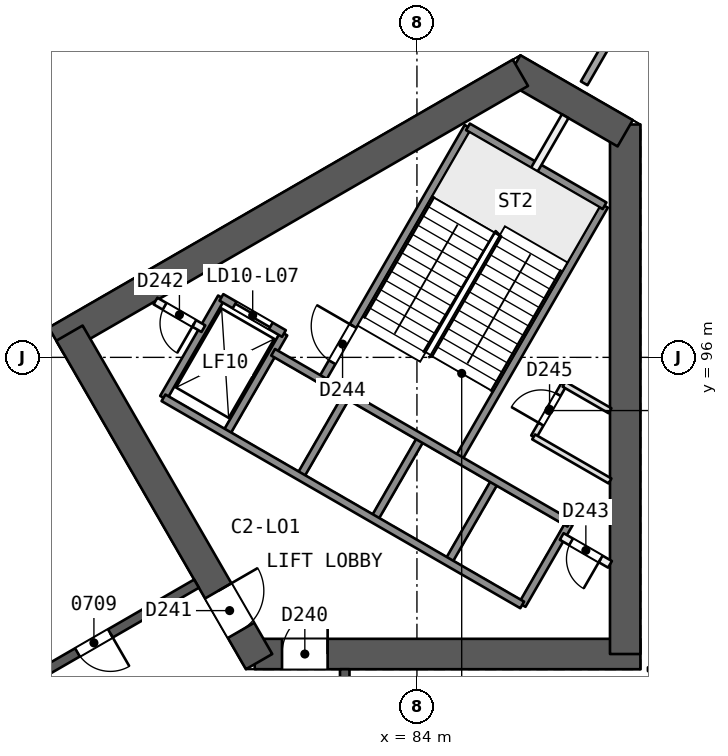
"""IFC4 building model, lengths in metres.
Left out: names, types, materials, properties, quantities, classifications, styles, units other than length and angle.
Written with IfcOpenShell. Run it as: python <this file> out.ifc"""

import sys

from ifc_helpers import new_model, si_unit, direction, frame, frame_2d, origin, place, context, subcontext, project, spatial, rectangle, extrude, element, fill, save


model = new_model("IFC4")
c1 = context("Model", 3, precision=1e-05, world=origin(), true_north=direction((0.0, 1.0)))
c2 = subcontext(c1, "Body", "Model", "MODEL_VIEW")
j1 = project(units=[si_unit("LENGTHUNIT", "METRE"), si_unit("PLANEANGLEUNIT", "RADIAN")], contexts=[c1])
p1 = place(None, origin())
s1 = spatial("IfcSite", under=j1, at=p1, CompositionType="ELEMENT")
p2 = place(p1, origin())
s2 = spatial("IfcBuilding", under=s1, at=p2, CompositionType="ELEMENT")
p3 = place(p2, frame((0.0, 0.0, 37.4)))
s3 = spatial("IfcBuildingStorey", under=s2, at=p3, CompositionType="ELEMENT", Elevation=37.4)
p4 = place(p3, frame((79.731, 88.194, 0.0), z_axis=(0.0, 0.0, 1.0), x_axis=(1.0, 0.0, 0.0)))
e1 = element("IfcWall", 1, at=p4, inside=s3, PredefinedType="SHEAR", context=c2, shape_type="SweptSolid", body=[
    extrude(rectangle(XDim=10.149, YDim=0.8, at=frame_2d((5.074, 0.0))), origin(), (0.0, 0.0, 1.0), 3.7),
])
p5 = place(p4, frame((0.719, 0.0, 0.0)))
e2 = element("IfcOpeningElement", 2, at=p5, cuts=e1, PredefinedType="OPENING", context=c2, shape_type="SweptSolid", body=[
    extrude(rectangle(XDim=1.2, YDim=2.1, at=frame_2d((0.6, 1.05))), frame((0.0, 0.411, 0.0), z_axis=(0.0, -1.0, 0.0), x_axis=(1.0, 0.0, 0.0)), (0.0, 0.0, 1.0), 0.821),
])
p6 = place(p3, frame((89.48, 88.194, 0.0), z_axis=(0.0, 0.0, 1.0), x_axis=(0.0, 1.0, 0.0)))
e3 = element("IfcWall", 3, at=p6, inside=s3, PredefinedType="SHEAR", context=c2, shape_type="SweptSolid", body=[
    extrude(rectangle(XDim=13.933, YDim=0.8, at=frame_2d((6.967, 0.0))), origin(), (0.0, 0.0, 1.0), 3.7),
])
p7 = place(p3, frame((89.48, 101.897, 0.0), z_axis=(0.0, 0.0, 1.0), x_axis=(-0.866034355626, 0.499984494636, 0.0)))
e4 = element("IfcWall", 4, at=p7, inside=s3, PredefinedType="SHEAR", context=c2, shape_type="SweptSolid", body=[
    extrude(rectangle(XDim=3.414, YDim=0.8, at=frame_2d((1.707, 0.0))), origin(), (0.0, 0.0, 1.0), 3.7),
])
p8 = place(p3, frame((86.723, 103.488, 0.0), z_axis=(0.0, 0.0, 1.0), x_axis=(-0.866032504327, -0.499987701298, 0.0)))
e5 = element("IfcWall", 5, at=p8, inside=s3, PredefinedType="SHEAR", context=c2, shape_type="SweptSolid", body=[
    extrude(rectangle(XDim=14.102, YDim=0.8, at=frame_2d((7.051, 0.0))), origin(), (0.0, 0.0, 1.0), 3.7),
])
p9 = place(p3, frame((74.856, 96.637, 0.0), z_axis=(0.0, 0.0, 1.0), x_axis=(0.499993500917, -0.866029155999, 0.0)))
e6 = element("IfcWall", 6, at=p9, inside=s3, PredefinedType="SHEAR", context=c2, shape_type="SweptSolid", body=[
    extrude(rectangle(XDim=9.98, YDim=0.8, at=frame_2d((4.99, 0.0))), origin(), (0.0, 0.0, 1.0), 3.7),
])
p10 = place(p9, frame((7.83, 0.0, 0.0)))
e7 = element("IfcOpeningElement", 7, at=p10, cuts=e6, PredefinedType="OPENING", context=c2, shape_type="SweptSolid", body=[
    extrude(rectangle(XDim=1.2, YDim=2.1, at=frame_2d((0.6, 1.05))), frame((0.0, 0.411, 0.0), z_axis=(0.0, -1.0, 0.0), x_axis=(1.0, 0.0, 0.0)), (0.0, 0.0, 1.0), 0.821),
])
p11 = place(p3, frame((82.1, 72.206, 0.0), z_axis=(0.0, 0.0, 1.0), x_axis=(0.0, 1.0, 0.0)))
e8 = element("IfcWall", 8, at=p11, inside=s3, PredefinedType="SHEAR", context=c2, shape_type="SweptSolid", body=[
    extrude(rectangle(XDim=15.588, YDim=0.25, at=frame_2d((7.794, 0.0))), origin(), (0.0, 0.0, 1.0), 3.2),
])
p12 = place(p11, frame((2.462, 0.0, 0.0)))
e9 = element("IfcOpeningElement", 9, at=p12, cuts=e8, PredefinedType="OPENING", context=c2, shape_type="SweptSolid", body=[
    extrude(rectangle(XDim=1.0, YDim=2.1, at=frame_2d((0.5, 1.05))), frame((0.0, 0.135, 0.0), z_axis=(0.0, -1.0, 0.0), x_axis=(1.0, 0.0, 0.0)), (0.0, 0.0, 1.0), 0.271),
])
p13 = place(p11, frame((8.315, 0.0, 0.0)))
e10 = element("IfcOpeningElement", 10, at=p13, cuts=e8, PredefinedType="OPENING", context=c2, shape_type="SweptSolid", body=[
    extrude(rectangle(XDim=1.1, YDim=2.1, at=frame_2d((0.55, 1.05))), frame((0.0, 0.135, 0.0), z_axis=(0.0, -1.0, 0.0), x_axis=(1.0, 0.0, 0.0)), (0.0, 0.0, 1.0), 0.271),
])
p14 = place(p11, frame((12.127, 0.0, 0.0)))
e11 = element("IfcOpeningElement", 11, at=p14, cuts=e8, PredefinedType="OPENING", context=c2, shape_type="SweptSolid", body=[
    extrude(rectangle(XDim=1.0, YDim=2.1, at=frame_2d((0.5, 1.05))), frame((0.0, 0.135, 0.0), z_axis=(0.0, -1.0, 0.0), x_axis=(1.0, 0.0, 0.0)), (0.0, 0.0, 1.0), 0.271),
])
p15 = place(p3, frame((78.2, 90.046, 0.0), z_axis=(0.0, 0.0, 1.0), x_axis=(-0.866026492143, -0.499998114903, 0.0)))
e12 = element("IfcWall", 12, at=p15, inside=s3, PredefinedType="SHEAR", context=c2, shape_type="SweptSolid", body=[
    extrude(rectangle(XDim=15.588, YDim=0.25, at=frame_2d((7.794, 0.0))), origin(), (0.0, 0.0, 1.0), 3.2),
])
p16 = place(p15, frame((2.618, 0.0, 0.0)))
e13 = element("IfcOpeningElement", 13, at=p16, cuts=e12, PredefinedType="OPENING", context=c2, shape_type="SweptSolid", body=[
    extrude(rectangle(XDim=1.0, YDim=2.1, at=frame_2d((0.5, 1.05))), frame((0.0, 0.135, 0.0), z_axis=(0.0, -1.0, 0.0), x_axis=(1.0, 0.0, 0.0)), (0.0, 0.0, 1.0), 0.271),
])
p17 = place(p15, frame((9.218, 0.0, 0.0)))
e14 = element("IfcOpeningElement", 14, at=p17, cuts=e12, PredefinedType="OPENING", context=c2, shape_type="SweptSolid", body=[
    extrude(rectangle(XDim=1.0, YDim=2.1, at=frame_2d((0.5, 1.05))), frame((0.0, 0.135, 0.0), z_axis=(0.0, -1.0, 0.0), x_axis=(1.0, 0.0, 0.0)), (0.0, 0.0, 1.0), 0.271),
])
p18 = place(p15, frame((12.594, 0.0, 0.0)))
e15 = element("IfcOpeningElement", 15, at=p18, cuts=e12, PredefinedType="OPENING", context=c2, shape_type="SweptSolid", body=[
    extrude(rectangle(XDim=1.0, YDim=2.1, at=frame_2d((0.5, 1.05))), frame((0.0, 0.135, 0.0), z_axis=(0.0, -1.0, 0.0), x_axis=(1.0, 0.0, 0.0)), (0.0, 0.0, 1.0), 0.271),
])
p19 = place(p3, frame((96.202, 87.794, 0.0), z_axis=(0.0, 0.0, 1.0), x_axis=(-1.0, 0.0, 0.0)))
e16 = element("IfcWall", 16, at=p19, inside=s3, PredefinedType="PARTITIONING", context=c2, shape_type="SweptSolid", body=[
    extrude(rectangle(XDim=6.123, YDim=0.1, at=frame_2d((3.061, 0.0))), origin(), (0.0, 0.0, 1.0), 3.2),
])
p20 = place(p19, frame((2.611, 0.0, 0.0)))
e17 = element("IfcOpeningElement", 17, at=p20, cuts=e16, PredefinedType="OPENING", context=c2, shape_type="SweptSolid", body=[
    extrude(rectangle(XDim=0.9, YDim=2.1, at=frame_2d((0.45, 1.05))), frame((0.0, 0.061, 0.0), z_axis=(0.0, -1.0, 0.0), x_axis=(1.0, 0.0, 0.0)), (0.0, 0.0, 1.0), 0.121),
])
p21 = place(p3, frame((93.556, 112.139, 0.0), z_axis=(0.0, 0.0, 1.0), x_axis=(-0.499997833203, -0.866026654782, 0.0)))
e18 = element("IfcWall", 18, at=p21, inside=s3, PredefinedType="PARTITIONING", context=c2, shape_type="SweptSolid", body=[
    extrude(rectangle(XDim=10.309, YDim=0.2, at=frame_2d((5.155, 0.0))), origin(), (0.0, 0.0, 1.0), 3.2),
])
p22 = place(p3, frame((37.74, 83.141, 0.0), z_axis=(0.0, 0.0, 1.0), x_axis=(0.866026524777, 0.499998058379, 0.0)))
e19 = element("IfcWall", 19, at=p22, inside=s3, PredefinedType="SOLIDWALL", context=c2, shape_type="SweptSolid", body=[
    extrude(rectangle(XDim=61.395, YDim=0.3, at=frame_2d((30.698, 0.0))), origin(), (0.0, 0.0, 1.0), 3.2),
])
p23 = place(p22, frame((34.174, 0.0, 0.0)))
e20 = element("IfcOpeningElement", 20, at=p23, cuts=e19, PredefinedType="OPENING", context=c2, shape_type="SweptSolid", body=[
    extrude(rectangle(XDim=2.4, YDim=2.4, at=frame_2d((1.2, 1.2))), frame((0.0, 0.161, 0.0), z_axis=(0.0, -1.0, 0.0), x_axis=(1.0, 0.0, 0.0)), (0.0, 0.0, 1.0), 0.321),
])
p24 = place(p22, frame((47.603, 0.0, 0.0)))
e21 = element("IfcOpeningElement", 21, at=p24, cuts=e19, PredefinedType="OPENING", context=c2, shape_type="SweptSolid", body=[
    extrude(rectangle(XDim=2.4, YDim=2.4, at=frame_2d((1.2, 1.2))), frame((0.0, 0.161, 0.0), z_axis=(0.0, -1.0, 0.0), x_axis=(1.0, 0.0, 0.0)), (0.0, 0.0, 1.0), 0.321),
])
p25 = place(p22, frame((24.198, 0.0, 0.0)))
e22 = element("IfcOpeningElement", 22, at=p25, cuts=e19, PredefinedType="OPENING", context=c2, shape_type="SweptSolid", body=[
    extrude(rectangle(XDim=2.4, YDim=2.4, at=frame_2d((1.2, 1.2))), frame((0.0, 0.161, 0.0), z_axis=(0.0, -1.0, 0.0), x_axis=(1.0, 0.0, 0.0)), (0.0, 0.0, 1.0), 0.321),
])
p26 = place(p22, frame((11.394, 0.0, 0.0)))
e23 = element("IfcOpeningElement", 23, at=p26, cuts=e19, PredefinedType="OPENING", context=c2, shape_type="SweptSolid", body=[
    extrude(rectangle(XDim=2.4, YDim=2.4, at=frame_2d((1.2, 1.2))), frame((0.0, 0.161, 0.0), z_axis=(0.0, -1.0, 0.0), x_axis=(1.0, 0.0, 0.0)), (0.0, 0.0, 1.0), 0.321),
])
p27 = place(p22, frame((28.874, 0.0, 0.0)))
e24 = element("IfcOpeningElement", 24, at=p27, cuts=e19, PredefinedType="OPENING", context=c2, shape_type="SweptSolid", body=[
    extrude(rectangle(XDim=2.4, YDim=2.4, at=frame_2d((1.2, 1.2))), frame((0.0, 0.161, 0.0), z_axis=(0.0, -1.0, 0.0), x_axis=(1.0, 0.0, 0.0)), (0.0, 0.0, 1.0), 0.321),
])
p28 = place(p3, frame((86.77, 89.486, 0.0), z_axis=(0.0, 0.0, 1.0), x_axis=(0.499961042966, 0.86604789447, 0.0)))
e25 = element("IfcWall", 25, at=p28, inside=s3, PredefinedType="SOLIDWALL", context=c2, shape_type="SweptSolid", body=[
    extrude(rectangle(XDim=2.48, YDim=0.2, at=frame_2d((1.24, 0.0))), origin(), (0.0, 0.0, 1.0), 3.2),
])
p29 = place(p3, frame((87.071, 93.908, 0.0), z_axis=(0.0, 0.0, 1.0), x_axis=(0.499995408039, 0.866028054938, 0.0)))
e26 = element("IfcWall", 26, at=p29, inside=s3, PredefinedType="PARTITIONING", context=c2, shape_type="SweptSolid", body=[
    extrude(rectangle(XDim=1.6, YDim=0.15, at=frame_2d((0.8, 0.0))), origin(), (0.0, 0.0, 1.0), 3.2),
])
p30 = place(p29, frame((0.387, 0.0, 0.0)))
e27 = element("IfcOpeningElement", 27, at=p30, cuts=e26, PredefinedType="OPENING", context=c2, shape_type="SweptSolid", body=[
    extrude(rectangle(XDim=0.9, YDim=2.1, at=frame_2d((0.45, 1.05))), frame((0.0, 0.085, 0.0), z_axis=(0.0, -1.0, 0.0), x_axis=(1.0, 0.0, 0.0)), (0.0, 0.0, 1.0), 0.171),
])
p31 = place(p3, frame((84.821, 90.611, 0.0), z_axis=(0.0, 0.0, 1.0), x_axis=(0.499961042966, 0.86604789447, 0.0)))
e28 = element("IfcWall", 28, at=p31, inside=s3, PredefinedType="SOLIDWALL", context=c2, shape_type="SweptSolid", body=[
    extrude(rectangle(XDim=2.48, YDim=0.2, at=frame_2d((1.24, 0.0))), origin(), (0.0, 0.0, 1.0), 3.2),
])
p32 = place(p3, frame((85.087, 93.321, 0.0), z_axis=(0.0, 0.0, 1.0), x_axis=(0.500019787375, 0.866013979237, 0.0)))
e29 = element("IfcWall", 29, at=p32, inside=s3, PredefinedType="SOLIDWALL", context=c2, shape_type="SweptSolid", body=[
    extrude(rectangle(XDim=7.7, YDim=0.2, at=frame_2d((3.85, 0.0))), origin(), (0.0, 0.0, 1.0), 3.2),
])
p33 = place(p3, frame((82.873, 91.736, 0.0), z_axis=(0.0, 0.0, 1.0), x_axis=(0.499961042966, 0.86604789447, 0.0)))
e30 = element("IfcWall", 30, at=p33, inside=s3, PredefinedType="SOLIDWALL", context=c2, shape_type="SweptSolid", body=[
    extrude(rectangle(XDim=2.48, YDim=0.2, at=frame_2d((1.24, 0.0))), origin(), (0.0, 0.0, 1.0), 3.2),
])
p34 = place(p3, frame((87.09, 100.94, 0.0), z_axis=(0.0, 0.0, 1.0), x_axis=(0.499956811548, 0.866050337213, 0.0)))
e31 = element("IfcWall", 31, at=p34, inside=s3, PredefinedType="PARTITIONING", context=c2, shape_type="SweptSolid", body=[
    extrude(rectangle(XDim=1.623, YDim=0.2, at=frame_2d((0.812, 0.0))), origin(), (0.0, 0.0, 1.0), 3.2),
])
p35 = place(p3, frame((80.924, 92.861, 0.0), z_axis=(0.0, 0.0, 1.0), x_axis=(0.499961042966, 0.86604789447, 0.0)))
e32 = element("IfcWall", 32, at=p35, inside=s3, PredefinedType="SOLIDWALL", context=c2, shape_type="SweptSolid", body=[
    extrude(rectangle(XDim=2.48, YDim=0.2, at=frame_2d((1.24, 0.0))), origin(), (0.0, 0.0, 1.0), 3.2),
])
p36 = place(p3, frame((81.493, 95.396, 0.0), z_axis=(0.0, 0.0, 1.0), x_axis=(0.500006057782, 0.866021906294, 0.0)))
e33 = element("IfcWall", 33, at=p36, inside=s3, PredefinedType="SOLIDWALL", context=c2, shape_type="SweptSolid", body=[
    extrude(rectangle(XDim=7.7, YDim=0.2, at=frame_2d((3.85, 0.0))), origin(), (0.0, 0.0, 1.0), 3.2),
])
p37 = place(p36, frame((0.55, 0.0, 0.0)))
e34 = element("IfcOpeningElement", 34, at=p37, cuts=e33, PredefinedType="OPENING", context=c2, shape_type="SweptSolid", body=[
    extrude(rectangle(XDim=1.1, YDim=2.1, at=frame_2d((0.55, 1.05))), frame((0.0, 0.11, 0.0), z_axis=(0.0, -1.0, 0.0), x_axis=(1.0, 0.0, 0.0)), (0.0, 0.0, 1.0), 0.221),
])
for number, where, z_axis, x_axis in (
    (35, (78.976, 93.986, 0.0), (0.0, 0.0, 1.0), (0.5, 0.866, 0.0)),
    (36, (77.33, 94.936, 0.0), (0.0, 0.0, 1.0), (0.5, 0.866, 0.0)),
):
    element("IfcWall", number, at=place(p3, frame(where, z_axis=z_axis, x_axis=x_axis)), inside=s3, PredefinedType="SOLIDWALL", context=c2, shape_type="SweptSolid", body=[
        extrude(rectangle(XDim=3.05, YDim=0.2, at=frame_2d((1.525, 0.0))), origin(), (0.0, 0.0, 1.0), 3.2),
    ])
p38 = place(p3, frame((86.77, 89.486, 0.0), z_axis=(0.0, 0.0, 1.0), x_axis=(-0.86601811187, 0.500012629753, 0.0)))
e37 = element("IfcWall", 37, at=p38, inside=s3, PredefinedType="SOLIDWALL", context=c2, shape_type="SweptSolid", body=[
    extrude(rectangle(XDim=10.9, YDim=0.2, at=frame_2d((5.45, 0.0))), origin(), (0.0, 0.0, 1.0), 3.2),
])
p39 = place(p3, frame((89.08, 90.554, 0.0), z_axis=(0.0, 0.0, 1.0), x_axis=(-0.866022048785, 0.500005810984, 0.0)))
e38 = element("IfcWall", 38, at=p39, inside=s3, PredefinedType="PARTITIONING", context=c2, shape_type="SweptSolid", body=[
    extrude(rectangle(XDim=1.467, YDim=0.2, at=frame_2d((0.733, 0.0))), origin(), (0.0, 0.0, 1.0), 3.2),
])
p40 = place(p39, frame((0.283, 0.0, 0.0)))
e39 = element("IfcOpeningElement", 39, at=p40, cuts=e38, PredefinedType="OPENING", context=c2, shape_type="SweptSolid", body=[
    extrude(rectangle(XDim=0.9, YDim=2.1, at=frame_2d((0.45, 1.05))), frame((0.0, 0.11, 0.0), z_axis=(0.0, -1.0, 0.0), x_axis=(1.0, 0.0, 0.0)), (0.0, 0.0, 1.0), 0.221),
])
p41 = place(p3, frame((78.38, 96.755, 0.0), z_axis=(0.0, 0.0, 1.0), x_axis=(-0.866003949776, 0.500037157592, 0.0)))
e40 = element("IfcWall", 40, at=p41, inside=s3, PredefinedType="PARTITIONING", context=c2, shape_type="SweptSolid", body=[
    extrude(rectangle(XDim=1.455, YDim=0.2, at=frame_2d((0.728, 0.0))), origin(), (0.0, 0.0, 1.0), 3.2),
])
p42 = place(p41, frame((0.278, 0.0, 0.0)))
e41 = element("IfcOpeningElement", 41, at=p42, cuts=e40, PredefinedType="OPENING", context=c2, shape_type="SweptSolid", body=[
    extrude(rectangle(XDim=0.9, YDim=2.1, at=frame_2d((0.45, 1.05))), frame((0.0, 0.11, 0.0), z_axis=(0.0, -1.0, 0.0), x_axis=(1.0, 0.0, 0.0)), (0.0, 0.0, 1.0), 0.221),
])
p43 = place(p3, frame((88.01, 91.634, 0.0), z_axis=(0.0, 0.0, 1.0), x_axis=(-0.866024315419, 0.5000018851, 0.0)))
e42 = element("IfcWall", 42, at=p43, inside=s3, PredefinedType="SOLIDWALL", context=c2, shape_type="SweptSolid", body=[
    extrude(rectangle(XDim=9.0, YDim=0.2, at=frame_2d((4.5, 0.0))), origin(), (0.0, 0.0, 1.0), 3.2),
])
p44 = place(p3, frame((80.5, 96.627, 0.0), z_axis=(0.0, 0.0, 1.0), x_axis=(-0.86601224135, 0.500022797313, 0.0)))
e43 = element("IfcWall", 43, at=p44, inside=s3, PredefinedType="SOLIDWALL", context=c2, shape_type="SweptSolid", body=[
    extrude(rectangle(XDim=1.9, YDim=0.2, at=frame_2d((0.95, 0.0))), origin(), (0.0, 0.0, 1.0), 3.2),
])
p45 = place(p44, frame((0.4, 0.0, 0.0)))
e44 = element("IfcOpeningElement", 44, at=p45, cuts=e43, PredefinedType="OPENING", context=c2, shape_type="SweptSolid", body=[
    extrude(rectangle(XDim=1.1, YDim=2.1, at=frame_2d((0.55, 1.05))), frame((0.0, 0.11, 0.0), z_axis=(0.0, -1.0, 0.0), x_axis=(1.0, 0.0, 0.0)), (0.0, 0.0, 1.0), 0.221),
])
p46 = place(p3, frame((89.08, 92.748, 0.0), z_axis=(0.0, 0.0, 1.0), x_axis=(-0.866026103983, 0.499998787219, 0.0)))
e45 = element("IfcWall", 45, at=p46, inside=s3, PredefinedType="PARTITIONING", context=c2, shape_type="SweptSolid", body=[
    extrude(rectangle(XDim=2.32, YDim=0.15, at=frame_2d((1.16, 0.0))), origin(), (0.0, 0.0, 1.0), 3.2),
])
p47 = place(p3, frame((89.08, 94.595, 0.0), z_axis=(0.0, 0.0, 1.0), x_axis=(-0.866028321769, 0.499994945868, 0.0)))
e46 = element("IfcWall", 46, at=p47, inside=s3, PredefinedType="PARTITIONING", context=c2, shape_type="SweptSolid", body=[
    extrude(rectangle(XDim=1.396, YDim=0.15, at=frame_2d((0.698, 0.0))), origin(), (0.0, 0.0, 1.0), 3.2),
])
p48 = place(p3, frame((88.937, 99.99, 0.0), z_axis=(0.0, 0.0, 1.0), x_axis=(-0.866004344652, 0.500036473714, 0.0)))
e47 = element("IfcWall", 47, at=p48, inside=s3, PredefinedType="SOLIDWALL", context=c2, shape_type="SweptSolid", body=[
    extrude(rectangle(XDim=4.15, YDim=0.2, at=frame_2d((2.075, 0.0))), origin(), (0.0, 0.0, 1.0), 3.2),
])
p49 = place(p16, origin())
e48 = element("IfcDoor", 48, at=p49, inside=s3, OperationType="SINGLE_SWING_LEFT", PredefinedType="NOTDEFINED", context=c2, shape_type="SweptSolid", body=[
    extrude(rectangle(XDim=1.0, YDim=2.1, at=frame_2d((0.5, 1.05))), frame((0.0, 0.025, 0.0), z_axis=(0.0, -1.0, 0.0), x_axis=(1.0, 0.0, 0.0)), (0.0, 0.0, 1.0), 0.05),
])
fill(e13, e48)
p50 = place(p5, origin())
e49 = element("IfcDoor", 49, at=p50, inside=s3, OperationType="SINGLE_SWING_RIGHT", PredefinedType="NOTDEFINED", context=c2, shape_type="SweptSolid", body=[
    extrude(rectangle(XDim=1.2, YDim=2.1, at=frame_2d((0.6, 1.05))), frame((0.0, 0.025, 0.0), z_axis=(0.0, -1.0, 0.0), x_axis=(1.0, 0.0, 0.0)), (0.0, 0.0, 1.0), 0.05),
])
fill(e2, e49)
p51 = place(p10, origin())
e50 = element("IfcDoor", 50, at=p51, inside=s3, OperationType="SINGLE_SWING_LEFT", PredefinedType="NOTDEFINED", context=c2, shape_type="SweptSolid", body=[
    extrude(rectangle(XDim=1.2, YDim=2.1, at=frame_2d((0.6, 1.05))), frame((0.0, 0.025, 0.0), z_axis=(0.0, -1.0, 0.0), x_axis=(1.0, 0.0, 0.0)), (0.0, 0.0, 1.0), 0.05),
])
fill(e7, e50)
p52 = place(p45, origin())
e51 = element("IfcDoor", 51, at=p52, inside=s3, OperationType="SLIDING_TO_RIGHT", PredefinedType="NOTDEFINED", context=c2, shape_type="SweptSolid", body=[
    extrude(rectangle(XDim=1.1, YDim=2.1, at=frame_2d((0.55, 1.05))), frame((0.0, 0.025, 0.0), z_axis=(0.0, -1.0, 0.0), x_axis=(1.0, 0.0, 0.0)), (0.0, 0.0, 1.0), 0.05),
])
fill(e44, e51)
p53 = place(p42, origin())
e52 = element("IfcDoor", 52, at=p53, inside=s3, OperationType="SINGLE_SWING_LEFT", PredefinedType="NOTDEFINED", context=c2, shape_type="SweptSolid", body=[
    extrude(rectangle(XDim=0.9, YDim=2.1, at=frame_2d((0.45, 1.05))), frame((0.0, 0.025, 0.0), z_axis=(0.0, -1.0, 0.0), x_axis=(1.0, 0.0, 0.0)), (0.0, 0.0, 1.0), 0.05),
])
fill(e41, e52)
p54 = place(p40, origin())
e53 = element("IfcDoor", 53, at=p54, inside=s3, OperationType="SINGLE_SWING_LEFT", PredefinedType="NOTDEFINED", context=c2, shape_type="SweptSolid", body=[
    extrude(rectangle(XDim=0.9, YDim=2.1, at=frame_2d((0.45, 1.05))), frame((0.0, 0.025, 0.0), z_axis=(0.0, -1.0, 0.0), x_axis=(1.0, 0.0, 0.0)), (0.0, 0.0, 1.0), 0.05),
])
fill(e39, e53)
p55 = place(p37, origin())
e54 = element("IfcDoor", 54, at=p55, inside=s3, OperationType="SINGLE_SWING_RIGHT", PredefinedType="NOTDEFINED", context=c2, shape_type="SweptSolid", body=[
    extrude(rectangle(XDim=1.1, YDim=2.1, at=frame_2d((0.55, 1.05))), frame((0.0, 0.025, 0.0), z_axis=(0.0, -1.0, 0.0), x_axis=(1.0, 0.0, 0.0)), (0.0, 0.0, 1.0), 0.05),
])
fill(e34, e54)
p56 = place(p30, origin())
e55 = element("IfcDoor", 55, at=p56, inside=s3, OperationType="SINGLE_SWING_LEFT", PredefinedType="NOTDEFINED", context=c2, shape_type="SweptSolid", body=[
    extrude(rectangle(XDim=0.9, YDim=2.1, at=frame_2d((0.45, 1.05))), frame((0.0, 0.025, 0.0), z_axis=(0.0, -1.0, 0.0), x_axis=(1.0, 0.0, 0.0)), (0.0, 0.0, 1.0), 0.05),
])
fill(e27, e55)
save(model, sys.argv[1])
